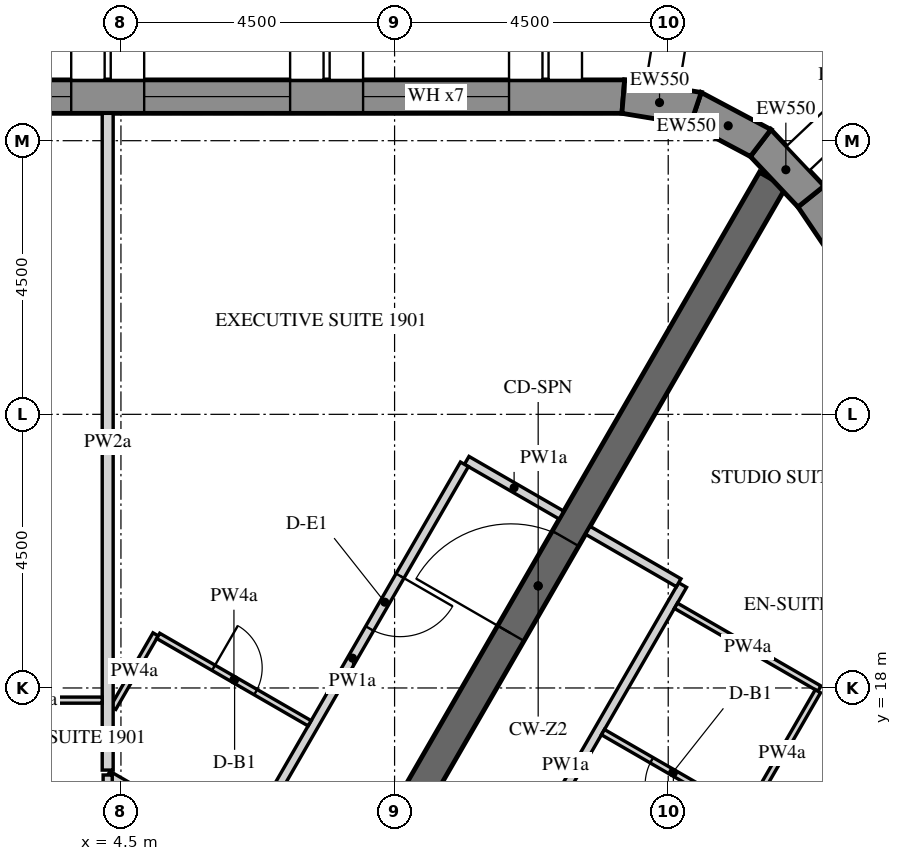
"""IFC4 building model, lengths in metres.
Left out: names, types, materials, properties, quantities, classifications, styles, units other than length and angle.
Written with IfcOpenShell. Run it as: python <this file> out.ifc"""

import sys

from ifc_helpers import new_model, si_unit, direction, frame, frame_2d, origin, place, context, subcontext, project, spatial, polyline, rectangle, outline, extrude, element, fill, save


model = new_model("IFC4")
c1 = context("Model", 3, precision=1e-05, world=origin(), true_north=direction((0.0, 1.0)))
c2 = subcontext(c1, "Body", "Model", "MODEL_VIEW")
j1 = project(units=[si_unit("LENGTHUNIT", "METRE"), si_unit("PLANEANGLEUNIT", "RADIAN")], contexts=[c1])
p1 = place(None, origin())
s1 = spatial("IfcSite", under=j1, at=p1, CompositionType="ELEMENT")
p2 = place(p1, origin())
s2 = spatial("IfcBuilding", under=s1, at=p2, CompositionType="ELEMENT")
p3 = place(p2, frame((0.0, 0.0, 238.5)))
s3 = spatial("IfcBuildingStorey", under=s2, at=p3, CompositionType="ELEMENT", Elevation=238.5)
p4 = place(p3, frame((12.761, 27.725, -0.15), z_axis=(0.0, 0.0, 1.0), x_axis=(-1.0, 0.0, 0.0)))
e1 = element("IfcWall", 1, at=p4, inside=s3, PredefinedType="SOLIDWALL", context=c2, shape_type="SweptSolid", body=[
    extrude(outline(polyline([(-0.022, -0.275), (27.783, -0.275), (27.732, 0.275), (0.022, 0.275), (-0.022, -0.275)])), origin(), (0.0, 0.0, 1.0), 3.9),
])
p5 = place(p4, frame((1.879, 0.0, 1.05)))
e2 = element("IfcOpeningElement", 2, at=p5, cuts=e1, PredefinedType="OPENING", context=c2, shape_type="SweptSolid", body=[
    extrude(rectangle(XDim=2.4, YDim=2.4, at=frame_2d((1.2, 1.2))), frame((0.0, 0.285, 0.0), z_axis=(0.0, -1.0, 0.0), x_axis=(1.0, 0.0, 0.0)), (0.0, 0.0, 1.0), 0.57),
])
p6 = place(p4, frame((5.479, 0.0, 1.05)))
e3 = element("IfcOpeningElement", 3, at=p6, cuts=e1, PredefinedType="OPENING", context=c2, shape_type="SweptSolid", body=[
    extrude(rectangle(XDim=2.4, YDim=2.4, at=frame_2d((1.2, 1.2))), frame((0.0, 0.285, 0.0), z_axis=(0.0, -1.0, 0.0), x_axis=(1.0, 0.0, 0.0)), (0.0, 0.0, 1.0), 0.57),
])
p7 = place(p4, frame((9.079, 0.0, 1.05)))
e4 = element("IfcOpeningElement", 4, at=p7, cuts=e1, PredefinedType="OPENING", context=c2, shape_type="SweptSolid", body=[
    extrude(rectangle(XDim=2.4, YDim=2.4, at=frame_2d((1.2, 1.2))), frame((0.0, 0.285, 0.0), z_axis=(0.0, -1.0, 0.0), x_axis=(1.0, 0.0, 0.0)), (0.0, 0.0, 1.0), 0.57),
])
p8 = place(p4, frame((12.679, 0.0, 1.05)))
e5 = element("IfcOpeningElement", 5, at=p8, cuts=e1, PredefinedType="OPENING", context=c2, shape_type="SweptSolid", body=[
    extrude(rectangle(XDim=2.4, YDim=2.4, at=frame_2d((1.2, 1.2))), frame((0.0, 0.285, 0.0), z_axis=(0.0, -1.0, 0.0), x_axis=(1.0, 0.0, 0.0)), (0.0, 0.0, 1.0), 0.57),
])
p9 = place(p4, frame((16.279, 0.0, 1.05)))
e6 = element("IfcOpeningElement", 6, at=p9, cuts=e1, PredefinedType="OPENING", context=c2, shape_type="SweptSolid", body=[
    extrude(rectangle(XDim=2.4, YDim=2.4, at=frame_2d((1.2, 1.2))), frame((0.0, 0.285, 0.0), z_axis=(0.0, -1.0, 0.0), x_axis=(1.0, 0.0, 0.0)), (0.0, 0.0, 1.0), 0.57),
])
p10 = place(p4, frame((19.879, 0.0, 1.05)))
e7 = element("IfcOpeningElement", 7, at=p10, cuts=e1, PredefinedType="OPENING", context=c2, shape_type="SweptSolid", body=[
    extrude(rectangle(XDim=2.4, YDim=2.4, at=frame_2d((1.2, 1.2))), frame((0.0, 0.285, 0.0), z_axis=(0.0, -1.0, 0.0), x_axis=(1.0, 0.0, 0.0)), (0.0, 0.0, 1.0), 0.57),
])
p11 = place(p4, frame((23.479, 0.0, 1.05)))
e8 = element("IfcOpeningElement", 8, at=p11, cuts=e1, PredefinedType="OPENING", context=c2, shape_type="SweptSolid", body=[
    extrude(rectangle(XDim=2.4, YDim=2.4, at=frame_2d((1.2, 1.2))), frame((0.0, 0.285, 0.0), z_axis=(0.0, -1.0, 0.0), x_axis=(1.0, 0.0, 0.0)), (0.0, 0.0, 1.0), 0.57),
])
p12 = place(p3, frame((31.371, 3.071, -0.15), z_axis=(0.0, 0.0, 1.0), x_axis=(-0.559189891278, 0.829039604297, 0.0)))
e9 = element("IfcWall", 9, at=p12, inside=s3, PredefinedType="SOLIDWALL", context=c2, shape_type="SweptSolid", body=[
    extrude(outline(polyline([(-0.026, -0.275), (27.781, -0.275), (27.736, 0.275), (0.026, 0.275), (-0.026, -0.275)])), origin(), (0.0, 0.0, 1.0), 3.9),
])
p13 = place(p12, frame((1.879, 0.0, 1.05)))
e10 = element("IfcOpeningElement", 10, at=p13, cuts=e9, PredefinedType="OPENING", context=c2, shape_type="SweptSolid", body=[
    extrude(rectangle(XDim=2.4, YDim=2.4, at=frame_2d((1.2, 1.2))), frame((0.0, 0.285, 0.0), z_axis=(0.0, -1.0, 0.0), x_axis=(1.0, 0.0, 0.0)), (0.0, 0.0, 1.0), 0.57),
])
p14 = place(p12, frame((5.479, 0.0, 1.05)))
e11 = element("IfcOpeningElement", 11, at=p14, cuts=e9, PredefinedType="OPENING", context=c2, shape_type="SweptSolid", body=[
    extrude(rectangle(XDim=2.4, YDim=2.4, at=frame_2d((1.2, 1.2))), frame((0.0, 0.285, 0.0), z_axis=(0.0, -1.0, 0.0), x_axis=(1.0, 0.0, 0.0)), (0.0, 0.0, 1.0), 0.57),
])
p15 = place(p12, frame((9.079, 0.0, 1.05)))
e12 = element("IfcOpeningElement", 12, at=p15, cuts=e9, PredefinedType="OPENING", context=c2, shape_type="SweptSolid", body=[
    extrude(rectangle(XDim=2.4, YDim=2.4, at=frame_2d((1.2, 1.2))), frame((0.0, 0.285, 0.0), z_axis=(0.0, -1.0, 0.0), x_axis=(1.0, 0.0, 0.0)), (0.0, 0.0, 1.0), 0.57),
])
p16 = place(p12, frame((12.679, 0.0, 1.05)))
e13 = element("IfcOpeningElement", 13, at=p16, cuts=e9, PredefinedType="OPENING", context=c2, shape_type="SweptSolid", body=[
    extrude(rectangle(XDim=2.4, YDim=2.4, at=frame_2d((1.2, 1.2))), frame((0.0, 0.285, 0.0), z_axis=(0.0, -1.0, 0.0), x_axis=(1.0, 0.0, 0.0)), (0.0, 0.0, 1.0), 0.57),
])
p17 = place(p12, frame((16.279, 0.0, 1.05)))
e14 = element("IfcOpeningElement", 14, at=p17, cuts=e9, PredefinedType="OPENING", context=c2, shape_type="SweptSolid", body=[
    extrude(rectangle(XDim=2.4, YDim=2.4, at=frame_2d((1.2, 1.2))), frame((0.0, 0.285, 0.0), z_axis=(0.0, -1.0, 0.0), x_axis=(1.0, 0.0, 0.0)), (0.0, 0.0, 1.0), 0.57),
])
p18 = place(p12, frame((19.879, 0.0, 1.05)))
e15 = element("IfcOpeningElement", 15, at=p18, cuts=e9, PredefinedType="OPENING", context=c2, shape_type="SweptSolid", body=[
    extrude(rectangle(XDim=2.4, YDim=2.4, at=frame_2d((1.2, 1.2))), frame((0.0, 0.285, 0.0), z_axis=(0.0, -1.0, 0.0), x_axis=(1.0, 0.0, 0.0)), (0.0, 0.0, 1.0), 0.57),
])
p19 = place(p12, frame((23.479, 0.0, 1.05)))
e16 = element("IfcOpeningElement", 16, at=p19, cuts=e9, PredefinedType="OPENING", context=c2, shape_type="SweptSolid", body=[
    extrude(rectangle(XDim=2.4, YDim=2.4, at=frame_2d((1.2, 1.2))), frame((0.0, 0.285, 0.0), z_axis=(0.0, -1.0, 0.0), x_axis=(1.0, 0.0, 0.0)), (0.0, 0.0, 1.0), 0.57),
])
p20 = place(p3, frame((15.849, 26.083, -0.15), z_axis=(0.0, 0.0, 1.0), x_axis=(-0.686196220404, 0.727416488061, 0.0)))
e17 = element("IfcWall", 17, at=p20, inside=s3, PredefinedType="SOLIDWALL", context=c2, shape_type="SweptSolid", body=[
    extrude(outline(polyline([(-0.022, -0.275), (1.253, -0.275), (1.163, 0.275), (0.022, 0.275), (-0.022, -0.275)])), origin(), (0.0, 0.0, 1.0), 3.9),
])
p21 = place(p3, frame((15.02, 26.962, -0.15), z_axis=(0.0, 0.0, 1.0), x_axis=(-0.882950818639, 0.469465495926, 0.0)))
e18 = element("IfcWall", 18, at=p21, inside=s3, PredefinedType="SOLIDWALL", context=c2, shape_type="SweptSolid", body=[
    extrude(outline(polyline([(-0.045, -0.275), (1.253, -0.275), (1.163, 0.275), (0.045, 0.275), (-0.045, -0.275)])), origin(), (0.0, 0.0, 1.0), 3.9),
])
p22 = place(p3, frame((13.953, 27.529, -0.15), z_axis=(0.0, 0.0, 1.0), x_axis=(-0.986751945211, 0.162236243244, 0.0)))
e19 = element("IfcWall", 19, at=p22, inside=s3, PredefinedType="SOLIDWALL", context=c2, shape_type="SweptSolid", body=[
    extrude(outline(polyline([(-0.045, -0.275), (1.231, -0.275), (1.186, 0.275), (0.045, 0.275), (-0.045, -0.275)])), origin(), (0.0, 0.0, 1.0), 3.9),
])
p23 = place(p3, frame((7.506, 13.0, -0.15), z_axis=(0.0, 0.0, 1.0), x_axis=(0.499988271576, 0.866032175087, 0.0)))
e20 = element("IfcWall", 20, at=p23, inside=s3, PredefinedType="SHEAR", context=c2, shape_type="SweptSolid", body=[
    extrude(rectangle(XDim=15.424, YDim=0.5, at=frame_2d((7.712, 0.0))), origin(), (0.0, 0.0, 1.0), 3.9),
])
p24 = place(p23, frame((6.812, 0.0, 0.15)))
e21 = element("IfcOpeningElement", 21, at=p24, cuts=e20, PredefinedType="OPENING", context=c2, shape_type="SweptSolid", body=[
    extrude(rectangle(XDim=1.8, YDim=2.4, at=frame_2d((0.9, 1.2))), frame((0.0, 0.26, 0.0), z_axis=(0.0, -1.0, 0.0), x_axis=(1.0, 0.0, 0.0)), (0.0, 0.0, 1.0), 0.52),
])
p25 = place(p3, frame((11.745, 20.843, 0.0), z_axis=(0.0, 0.0, 1.0), x_axis=(-0.865989075817, 0.500062916607, 0.0)))
e22 = element("IfcWall", 22, at=p25, inside=s3, PredefinedType="PARTITIONING", context=c2, shape_type="SweptSolid", body=[
    extrude(rectangle(XDim=1.8, YDim=0.15, at=frame_2d((0.9, 0.0))), origin(), (0.0, 0.0, 1.0), 2.838),
])
p26 = place(p3, frame((10.149, 21.678, 0.0), z_axis=(0.0, 0.0, 1.0), x_axis=(-0.500020076982, -0.866013812023, 0.0)))
e23 = element("IfcWall", 23, at=p26, inside=s3, PredefinedType="PARTITIONING", context=c2, shape_type="SweptSolid", body=[
    extrude(rectangle(XDim=7.361, YDim=0.15, at=frame_2d((3.681, 0.0))), origin(), (0.0, 0.0, 1.0), 2.838),
])
p27 = place(p26, frame((2.118, 0.0, 0.0)))
e24 = element("IfcOpeningElement", 24, at=p27, cuts=e23, PredefinedType="OPENING", context=c2, shape_type="SweptSolid", body=[
    extrude(rectangle(XDim=1.0, YDim=2.1, at=frame_2d((0.5, 1.05))), frame((0.0, 0.085, 0.0), z_axis=(0.0, -1.0, 0.0), x_axis=(1.0, 0.0, 0.0)), (0.0, 0.0, 1.0), 0.17),
])
p28 = place(p3, frame((6.403, 15.341, 0.0), z_axis=(0.0, 0.0, 1.0), x_axis=(-0.8660013066, 0.500041735226, 0.0)))
e25 = element("IfcWall", 25, at=p28, inside=s3, PredefinedType="PARTITIONING", context=c2, shape_type="SweptSolid", body=[
    extrude(rectangle(XDim=2.449, YDim=0.15, at=frame_2d((1.225, 0.0))), origin(), (0.0, 0.0, 1.0), 2.838),
])
p29 = place(p3, frame((4.282, 16.569, 0.0), z_axis=(0.0, 0.0, 1.0), x_axis=(0.0, -1.0, 0.0)))
e26 = element("IfcWall", 26, at=p29, inside=s3, PredefinedType="PARTITIONING", context=c2, shape_type="SweptSolid", body=[
    extrude(rectangle(XDim=1.569, YDim=0.15, at=frame_2d((0.785, 0.0))), origin(), (0.0, 0.0, 1.0), 2.838),
])
p30 = place(p3, frame((9.887, 13.025, 0.0), z_axis=(0.0, 0.0, 1.0), x_axis=(0.499985955615, 0.866033512162, 0.0)))
e27 = element("IfcWall", 27, at=p30, inside=s3, PredefinedType="PARTITIONING", context=c2, shape_type="SweptSolid", body=[
    extrude(rectangle(XDim=7.699, YDim=0.15, at=frame_2d((3.85, 0.0))), origin(), (0.0, 0.0, 1.0), 2.838),
])
p31 = place(p30, frame((2.106, 0.0, 0.0)))
e28 = element("IfcOpeningElement", 28, at=p31, cuts=e27, PredefinedType="OPENING", context=c2, shape_type="SweptSolid", body=[
    extrude(rectangle(XDim=1.0, YDim=2.1, at=frame_2d((0.5, 1.05))), frame((0.0, 0.085, 0.0), z_axis=(0.0, -1.0, 0.0), x_axis=(1.0, 0.0, 0.0)), (0.0, 0.0, 1.0), 0.17),
])
p32 = place(p3, frame((13.672, 19.73, 0.0), z_axis=(0.0, 0.0, 1.0), x_axis=(-0.866074815912, 0.499914405916, 0.0)))
e29 = element("IfcWall", 29, at=p32, inside=s3, PredefinedType="PARTITIONING", context=c2, shape_type="SweptSolid", body=[
    extrude(rectangle(XDim=1.725, YDim=0.15, at=frame_2d((0.862, 0.0))), origin(), (0.0, 0.0, 1.0), 2.838),
])
p33 = place(p3, frame((4.372, 17.673, 0.0), z_axis=(0.0, 0.0, 1.0), x_axis=(0.50007068215, 0.86598459158, 0.0)))
e30 = element("IfcWall", 30, at=p33, inside=s3, PredefinedType="PARTITIONING", context=c2, shape_type="SweptSolid", body=[
    extrude(rectangle(XDim=1.396, YDim=0.1, at=frame_2d((0.698, 0.0))), origin(), (0.0, 0.0, 1.0), 2.838),
])
p34 = place(p3, frame((5.113, 18.857, 0.0), z_axis=(0.0, 0.0, 1.0), x_axis=(0.866039941686, -0.499974818771, 0.0)))
e31 = element("IfcWall", 31, at=p34, inside=s3, PredefinedType="PARTITIONING", context=c2, shape_type="SweptSolid", body=[
    extrude(rectangle(XDim=2.875, YDim=0.1, at=frame_2d((1.438, 0.0))), origin(), (0.0, 0.0, 1.0), 2.838),
])
p35 = place(p34, frame((1.05, 0.0, 0.0)))
e32 = element("IfcOpeningElement", 32, at=p35, cuts=e31, PredefinedType="OPENING", context=c2, shape_type="SweptSolid", body=[
    extrude(rectangle(XDim=0.8, YDim=2.1, at=frame_2d((0.4, 1.05))), frame((0.0, 0.06, 0.0), z_axis=(0.0, -1.0, 0.0), x_axis=(1.0, 0.0, 0.0)), (0.0, 0.0, 1.0), 0.12),
])
p36 = place(p3, frame((4.282, 27.45, 0.0), z_axis=(0.0, 0.0, 1.0), x_axis=(0.0, -1.0, 0.0)))
e33 = element("IfcWall", 33, at=p36, inside=s3, PredefinedType="PARTITIONING", context=c2, shape_type="SweptSolid", body=[
    extrude(rectangle(XDim=10.801, YDim=0.18, at=frame_2d((5.4, 0.0))), origin(), (0.0, 0.0, 1.0), 2.838),
])
p37 = place(p3, frame((1.932, 17.8, 0.0), z_axis=(0.0, 0.0, 1.0), x_axis=(1.0, 0.0, 0.0)))
e34 = element("IfcWall", 34, at=p37, inside=s3, PredefinedType="PARTITIONING", context=c2, shape_type="SweptSolid", body=[
    extrude(rectangle(XDim=2.26, YDim=0.1, at=frame_2d((1.13, 0.0))), origin(), (0.0, 0.0, 1.0), 2.838),
])
p38 = place(p3, frame((20.363, 18.9, 0.0), z_axis=(0.0, 0.0, 1.0), x_axis=(-0.829027307641, -0.559208121531, 0.0)))
e35 = element("IfcWall", 35, at=p38, inside=s3, PredefinedType="PARTITIONING", context=c2, shape_type="SweptSolid", body=[
    extrude(rectangle(XDim=12.039, YDim=0.18, at=frame_2d((6.02, 0.0))), origin(), (0.0, 0.0, 1.0), 2.838),
])
p39 = place(p3, frame((13.627, 19.352, 0.0), z_axis=(0.0, 0.0, 1.0), x_axis=(0.866012511928, -0.500022328685, 0.0)))
e36 = element("IfcWall", 36, at=p39, inside=s3, PredefinedType="PARTITIONING", context=c2, shape_type="SweptSolid", body=[
    extrude(rectangle(XDim=2.725, YDim=0.1, at=frame_2d((1.363, 0.0))), origin(), (0.0, 0.0, 1.0), 2.838),
])
p40 = place(p3, frame((15.962, 17.947, 0.0), z_axis=(0.0, 0.0, 1.0), x_axis=(-0.500016218704, -0.866016039709, 0.0)))
e37 = element("IfcWall", 37, at=p40, inside=s3, PredefinedType="PARTITIONING", context=c2, shape_type="SweptSolid", body=[
    extrude(rectangle(XDim=2.35, YDim=0.1, at=frame_2d((1.175, 0.0))), origin(), (0.0, 0.0, 1.0), 2.838),
])
p41 = place(p3, frame((14.743, 15.936, 0.0), z_axis=(0.0, 0.0, 1.0), x_axis=(-0.86604424267, 0.499967368674, 0.0)))
e38 = element("IfcWall", 38, at=p41, inside=s3, PredefinedType="PARTITIONING", context=c2, shape_type="SweptSolid", body=[
    extrude(rectangle(XDim=2.675, YDim=0.1, at=frame_2d((1.337, 0.0))), origin(), (0.0, 0.0, 1.0), 2.838),
])
p42 = place(p41, frame((0.95, 0.0, 0.0)))
e39 = element("IfcOpeningElement", 39, at=p42, cuts=e38, PredefinedType="OPENING", context=c2, shape_type="SweptSolid", body=[
    extrude(rectangle(XDim=0.8, YDim=2.1, at=frame_2d((0.4, 1.05))), frame((0.0, 0.06, 0.0), z_axis=(0.0, -1.0, 0.0), x_axis=(1.0, 0.0, 0.0)), (0.0, 0.0, 1.0), 0.12),
])
p43 = place(p5, frame((0.0, 0.205, 0.0)))
e40 = element("IfcWindow", 40, at=p43, inside=s3, PartitioningType="DOUBLE_PANEL_VERTICAL", PredefinedType="WINDOW", context=c2, shape_type="SweptSolid", body=[
    extrude(rectangle(XDim=2.4, YDim=2.4, at=frame_2d((1.2, 1.2))), frame((0.0, 0.03, 0.0), z_axis=(0.0, -1.0, 0.0), x_axis=(1.0, 0.0, 0.0)), (0.0, 0.0, 1.0), 0.06),
])
fill(e2, e40)
p44 = place(p6, frame((0.0, 0.205, 0.0)))
e41 = element("IfcWindow", 41, at=p44, inside=s3, PartitioningType="DOUBLE_PANEL_VERTICAL", PredefinedType="WINDOW", context=c2, shape_type="SweptSolid", body=[
    extrude(rectangle(XDim=2.4, YDim=2.4, at=frame_2d((1.2, 1.2))), frame((0.0, 0.03, 0.0), z_axis=(0.0, -1.0, 0.0), x_axis=(1.0, 0.0, 0.0)), (0.0, 0.0, 1.0), 0.06),
])
fill(e3, e41)
p45 = place(p7, frame((0.0, 0.205, 0.0)))
e42 = element("IfcWindow", 42, at=p45, inside=s3, PartitioningType="DOUBLE_PANEL_VERTICAL", PredefinedType="WINDOW", context=c2, shape_type="SweptSolid", body=[
    extrude(rectangle(XDim=2.4, YDim=2.4, at=frame_2d((1.2, 1.2))), frame((0.0, 0.03, 0.0), z_axis=(0.0, -1.0, 0.0), x_axis=(1.0, 0.0, 0.0)), (0.0, 0.0, 1.0), 0.06),
])
fill(e4, e42)
p46 = place(p24, origin())
e43 = element("IfcDoor", 43, at=p46, inside=s3, OperationType="DOUBLE_DOOR_SINGLE_SWING", PredefinedType="DOOR", context=c2, shape_type="SweptSolid", body=[
    extrude(rectangle(XDim=1.8, YDim=2.4, at=frame_2d((0.9, 1.2))), frame((0.0, 0.025, 0.0), z_axis=(0.0, -1.0, 0.0), x_axis=(1.0, 0.0, 0.0)), (0.0, 0.0, 1.0), 0.05),
])
fill(e21, e43)
p47 = place(p27, origin())
e44 = element("IfcDoor", 44, at=p47, inside=s3, OperationType="SINGLE_SWING_LEFT", PredefinedType="DOOR", context=c2, shape_type="SweptSolid", body=[
    extrude(rectangle(XDim=1.0, YDim=2.1, at=frame_2d((0.5, 1.05))), frame((0.0, 0.025, 0.0), z_axis=(0.0, -1.0, 0.0), x_axis=(1.0, 0.0, 0.0)), (0.0, 0.0, 1.0), 0.05),
])
fill(e24, e44)
p48 = place(p35, origin())
e45 = element("IfcDoor", 45, at=p48, inside=s3, OperationType="SINGLE_SWING_RIGHT", PredefinedType="DOOR", context=c2, shape_type="SweptSolid", body=[
    extrude(rectangle(XDim=0.8, YDim=2.1, at=frame_2d((0.4, 1.05))), frame((0.0, 0.025, 0.0), z_axis=(0.0, -1.0, 0.0), x_axis=(1.0, 0.0, 0.0)), (0.0, 0.0, 1.0), 0.05),
])
fill(e32, e45)
p49 = place(p42, origin())
e46 = element("IfcDoor", 46, at=p49, inside=s3, OperationType="SINGLE_SWING_RIGHT", PredefinedType="DOOR", context=c2, shape_type="SweptSolid", body=[
    extrude(rectangle(XDim=0.8, YDim=2.1, at=frame_2d((0.4, 1.05))), frame((0.0, 0.025, 0.0), z_axis=(0.0, -1.0, 0.0), x_axis=(1.0, 0.0, 0.0)), (0.0, 0.0, 1.0), 0.05),
])
fill(e39, e46)
save(model, sys.argv[1])
